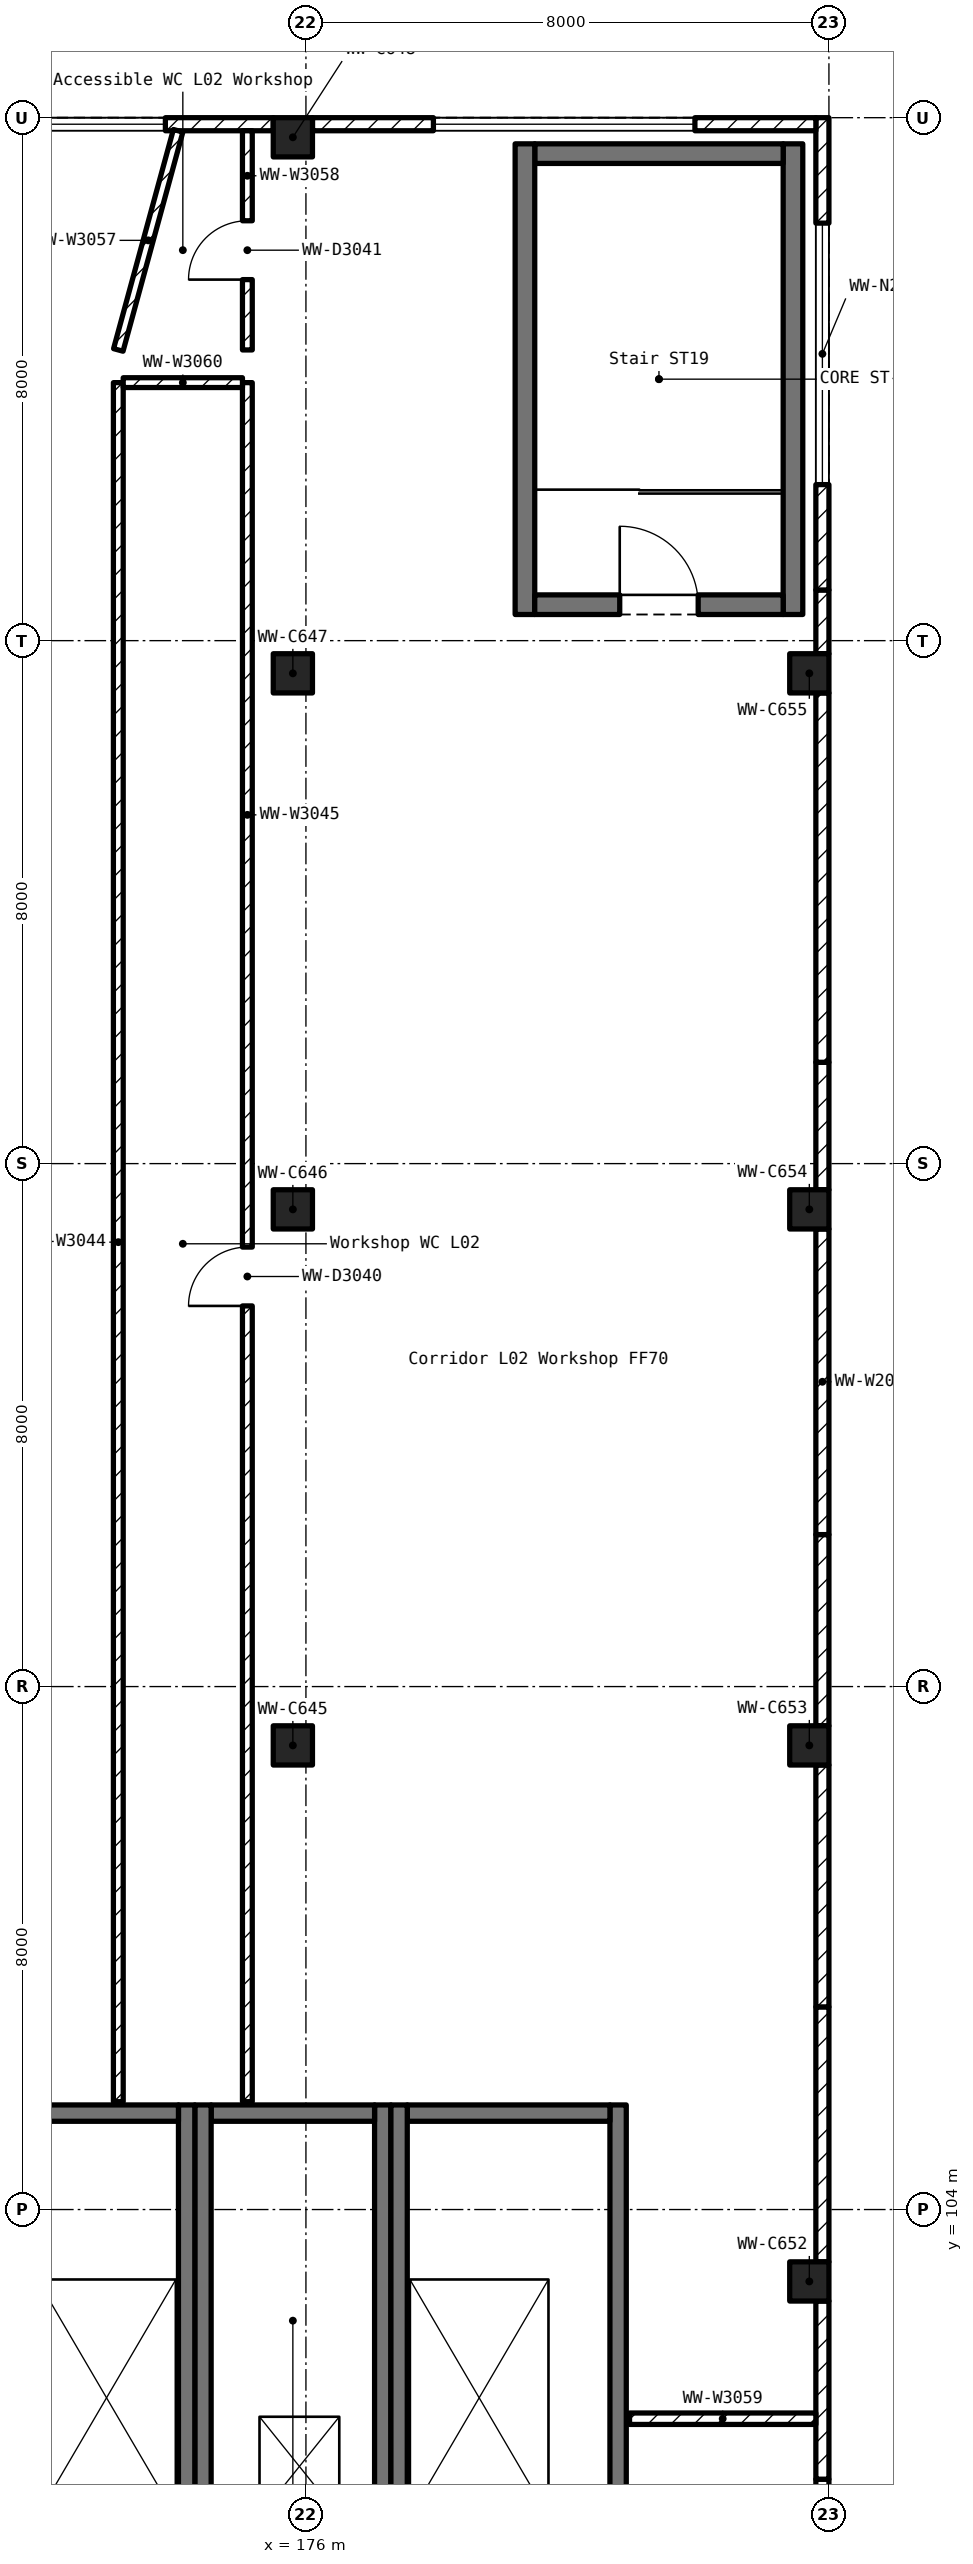
"""IFC4 building model, lengths in metres.
Left out: names, types, materials, properties, quantities, classifications, styles, units other than length and angle.
Written with IfcOpenShell. Run it as: python <this file> out.ifc"""

import sys

from ifc_helpers import new_model, si_unit, direction, frame, frame_2d, origin, origin_2d, place, context, subcontext, project, spatial, rectangle, extrude, element, fill, save


model = new_model("IFC4")
c1 = context("Model", 3, precision=1e-05, world=origin(), true_north=direction((0.0, 1.0)))
c2 = subcontext(c1, "Body", "Model", "MODEL_VIEW")
j1 = project(units=[si_unit("LENGTHUNIT", "METRE"), si_unit("PLANEANGLEUNIT", "RADIAN")], contexts=[c1])
p1 = place(None, origin())
s1 = spatial("IfcSite", under=j1, at=p1, CompositionType="ELEMENT")
p2 = place(p1, origin())
s2 = spatial("IfcBuilding", under=s1, at=p2, CompositionType="ELEMENT")
p3 = place(p2, frame((0.0, 0.0, 11.5)))
s3 = spatial("IfcBuildingStorey", under=s2, at=p3, CompositionType="ELEMENT", Elevation=11.5)
for number, where, z_axis, x_axis in (
    (1, (175.8, 111.1, 0.0), (0.0, 0.0, 1.0), (1.0, 0.0, 0.0)),
    (2, (175.8, 119.3, 0.0), (0.0, 0.0, 1.0), (1.0, 0.0, 0.0)),
    (3, (175.8, 127.5, 0.0), (0.0, 0.0, 1.0), (1.0, 0.0, 0.0)),
    (4, (175.8, 135.7, 0.0), (0.0, 0.0, 1.0), (1.0, 0.0, 0.0)),
    (5, (183.7, 102.9, 0.0), (0.0, 0.0, 1.0), (1.0, 0.0, 0.0)),
    (6, (183.7, 111.1, 0.0), (0.0, 0.0, 1.0), (1.0, 0.0, 0.0)),
    (7, (183.7, 119.3, 0.0), (0.0, 0.0, 1.0), (1.0, 0.0, 0.0)),
    (8, (183.7, 127.5, 0.0), (0.0, 0.0, 1.0), (1.0, 0.0, 0.0)),
):
    element("IfcColumn", number, at=place(p3, frame(where, z_axis=z_axis, x_axis=x_axis)), inside=s3, PredefinedType="COLUMN", context=c2, shape_type="SweptSolid", body=[
        extrude(rectangle(XDim=0.6, YDim=0.6, at=origin_2d()), origin(), (0.0, 0.0, 1.0), 5.5),
    ])
p4 = place(p3, frame((183.9, 95.0, 0.0), z_axis=(0.0, 0.0, 1.0), x_axis=(0.0, 1.0, 0.0)))
e9 = element("IfcWall", 9, at=p4, inside=s3, PredefinedType="SOLIDWALL", context=c2, shape_type="SweptSolid", body=[
    extrude(rectangle(XDim=4.875, YDim=0.2, at=frame_2d((2.438, 0.0))), origin(), (0.0, 0.0, 1.0), 4.55),
])
p5 = place(p3, frame((183.9, 99.875, 0.0), z_axis=(0.0, 0.0, 1.0), x_axis=(0.0, 1.0, 0.0)))
e10 = element("IfcWall", 10, at=p5, inside=s3, PredefinedType="SOLIDWALL", context=c2, shape_type="SweptSolid", body=[
    extrude(rectangle(XDim=2.725, YDim=0.2, at=frame_2d((1.363, 0.0))), origin(), (0.0, 0.0, 1.0), 4.45),
])
p6 = place(p3, frame((183.9, 103.2, 0.0), z_axis=(0.0, 0.0, 1.0), x_axis=(0.0, 1.0, 0.0)))
e11 = element("IfcWall", 11, at=p6, inside=s3, PredefinedType="SOLIDWALL", context=c2, shape_type="SweptSolid", body=[
    extrude(rectangle(XDim=3.9, YDim=0.2, at=frame_2d((1.95, 0.0))), origin(), (0.0, 0.0, 1.0), 4.45),
])
p7 = place(p3, frame((183.9, 107.1, 0.0), z_axis=(0.0, 0.0, 1.0), x_axis=(0.0, 1.0, 0.0)))
e12 = element("IfcWall", 12, at=p7, inside=s3, PredefinedType="SOLIDWALL", context=c2, shape_type="SweptSolid", body=[
    extrude(rectangle(XDim=3.7, YDim=0.2, at=frame_2d((1.85, 0.0))), origin(), (0.0, 0.0, 1.0), 4.45),
])
p8 = place(p3, frame((183.9, 111.4, 0.0), z_axis=(0.0, 0.0, 1.0), x_axis=(0.0, 1.0, 0.0)))
e13 = element("IfcWall", 13, at=p8, inside=s3, PredefinedType="SOLIDWALL", context=c2, shape_type="SweptSolid", body=[
    extrude(rectangle(XDim=2.925, YDim=0.2, at=frame_2d((1.462, 0.0))), origin(), (0.0, 0.0, 1.0), 4.45),
])
p9 = place(p3, frame((183.9, 114.325, 0.0), z_axis=(0.0, 0.0, 1.0), x_axis=(0.0, 1.0, 0.0)))
e14 = element("IfcWall", 14, at=p9, inside=s3, PredefinedType="SOLIDWALL", context=c2, shape_type="SweptSolid", body=[
    extrude(rectangle(XDim=4.675, YDim=0.2, at=frame_2d((2.337, 0.0))), origin(), (0.0, 0.0, 1.0), 4.45),
])
p10 = place(p3, frame((183.9, 119.6, 0.0), z_axis=(0.0, 0.0, 1.0), x_axis=(0.0, 1.0, 0.0)))
e15 = element("IfcWall", 15, at=p10, inside=s3, PredefinedType="SOLIDWALL", context=c2, shape_type="SweptSolid", body=[
    extrude(rectangle(XDim=1.95, YDim=0.2, at=frame_2d((0.975, 0.0))), origin(), (0.0, 0.0, 1.0), 4.45),
])
p11 = place(p3, frame((183.9, 121.55, 0.0), z_axis=(0.0, 0.0, 1.0), x_axis=(0.0, 1.0, 0.0)))
e16 = element("IfcWall", 16, at=p11, inside=s3, PredefinedType="SOLIDWALL", context=c2, shape_type="SweptSolid", body=[
    extrude(rectangle(XDim=5.65, YDim=0.2, at=frame_2d((2.825, 0.0))), origin(), (0.0, 0.0, 1.0), 4.45),
])
p12 = place(p3, frame((183.9, 127.8, 0.0), z_axis=(0.0, 0.0, 1.0), x_axis=(0.0, 1.0, 0.0)))
e17 = element("IfcWall", 17, at=p12, inside=s3, PredefinedType="SOLIDWALL", context=c2, shape_type="SweptSolid", body=[
    extrude(rectangle(XDim=0.975, YDim=0.2, at=frame_2d((0.487, 0.0))), origin(), (0.0, 0.0, 1.0), 4.45),
])
p13 = place(p3, frame((183.9, 128.775, 0.0), z_axis=(0.0, 0.0, 1.0), x_axis=(0.0, 1.0, 0.0)))
e18 = element("IfcWall", 18, at=p13, inside=s3, PredefinedType="SOLIDWALL", context=c2, shape_type="SweptSolid", body=[
    extrude(rectangle(XDim=7.225, YDim=0.2, at=frame_2d((3.613, 0.0))), origin(), (0.0, 0.0, 1.0), 4.45),
])
p14 = place(p13, frame((1.612, 0.0, 1.0)))
e19 = element("IfcOpeningElement", 19, at=p14, cuts=e18, PredefinedType="OPENING", context=c2, shape_type="SweptSolid", body=[
    extrude(rectangle(XDim=4.0, YDim=1.8, at=frame_2d((2.0, 0.9))), frame((0.0, 0.112, 0.0), z_axis=(0.0, -1.0, 0.0), x_axis=(1.0, 0.0, 0.0)), (0.0, 0.0, 1.0), 0.224),
])
p15 = place(p3, frame((183.8, 135.9, 0.0), z_axis=(0.0, 0.0, 1.0), x_axis=(-1.0, 0.0, 0.0)))
e20 = element("IfcWall", 20, at=p15, inside=s3, PredefinedType="SOLIDWALL", context=c2, shape_type="SweptSolid", body=[
    extrude(rectangle(XDim=7.7, YDim=0.2, at=frame_2d((3.85, 0.0))), origin(), (0.0, 0.0, 1.0), 4.45),
])
p16 = place(p15, frame((1.85, 0.0, 1.0)))
e21 = element("IfcOpeningElement", 21, at=p16, cuts=e20, PredefinedType="OPENING", context=c2, shape_type="SweptSolid", body=[
    extrude(rectangle(XDim=4.0, YDim=1.8, at=frame_2d((2.0, 0.9))), frame((0.0, 0.112, 0.0), z_axis=(0.0, -1.0, 0.0), x_axis=(1.0, 0.0, 0.0)), (0.0, 0.0, 1.0), 0.224),
])
p17 = place(p3, frame((175.5, 135.9, 0.0), z_axis=(0.0, 0.0, 1.0), x_axis=(-1.0, 0.0, 0.0)))
e22 = element("IfcWall", 22, at=p17, inside=s3, PredefinedType="SOLIDWALL", context=c2, shape_type="SweptSolid", body=[
    extrude(rectangle(XDim=7.3, YDim=0.2, at=frame_2d((3.65, 0.0))), origin(), (0.0, 0.0, 1.0), 4.45),
])
p18 = place(p17, frame((1.65, 0.0, 1.0)))
e23 = element("IfcOpeningElement", 23, at=p18, cuts=e22, PredefinedType="OPENING", context=c2, shape_type="SweptSolid", body=[
    extrude(rectangle(XDim=4.0, YDim=1.8, at=frame_2d((2.0, 0.9))), frame((0.0, 0.112, 0.0), z_axis=(0.0, -1.0, 0.0), x_axis=(1.0, 0.0, 0.0)), (0.0, 0.0, 1.0), 0.224),
])
p19 = place(p3, frame((183.45, 128.4, 0.0), z_axis=(0.0, 0.0, 1.0), x_axis=(0.0, 1.0, 0.0)))
e24 = element("IfcWall", 24, at=p19, inside=s3, PredefinedType="SOLIDWALL", context=c2, shape_type="SweptSolid", body=[
    extrude(rectangle(XDim=7.2, YDim=0.3, at=frame_2d((3.6, 0.0))), origin(), (0.0, 0.0, 1.0), 5.25),
])
p20 = place(p3, frame((183.3, 135.45, 0.0), z_axis=(0.0, 0.0, 1.0), x_axis=(-1.0, 0.0, 0.0)))
e25 = element("IfcWall", 25, at=p20, inside=s3, PredefinedType="SOLIDWALL", context=c2, shape_type="SweptSolid", body=[
    extrude(rectangle(XDim=3.8, YDim=0.3, at=frame_2d((1.9, 0.0))), origin(), (0.0, 0.0, 1.0), 5.25),
])
p21 = place(p3, frame((179.35, 135.6, 0.0), z_axis=(0.0, 0.0, 1.0), x_axis=(0.0, -1.0, 0.0)))
e26 = element("IfcWall", 26, at=p21, inside=s3, PredefinedType="SOLIDWALL", context=c2, shape_type="SweptSolid", body=[
    extrude(rectangle(XDim=7.2, YDim=0.3, at=frame_2d((3.6, 0.0))), origin(), (0.0, 0.0, 1.0), 5.25),
])
p22 = place(p3, frame((179.5, 128.55, 0.0), z_axis=(0.0, 0.0, 1.0), x_axis=(1.0, 0.0, 0.0)))
e27 = element("IfcWall", 27, at=p22, inside=s3, PredefinedType="SOLIDWALL", context=c2, shape_type="SweptSolid", body=[
    extrude(rectangle(XDim=3.8, YDim=0.3, at=frame_2d((1.9, 0.0))), origin(), (0.0, 0.0, 1.0), 5.25),
])
p23 = place(p22, frame((1.3, 0.0, 0.0)))
e28 = element("IfcOpeningElement", 28, at=p23, cuts=e27, PredefinedType="OPENING", context=c2, shape_type="SweptSolid", body=[
    extrude(rectangle(XDim=1.2, YDim=2.1, at=frame_2d((0.6, 1.05))), frame((0.0, 0.162, 0.0), z_axis=(0.0, -1.0, 0.0), x_axis=(1.0, 0.0, 0.0)), (0.0, 0.0, 1.0), 0.324),
])
p24 = place(p3, frame((177.175, 99.0, 0.0), z_axis=(0.0, 0.0, 1.0), x_axis=(0.0, 1.0, 0.0)))
e29 = element("IfcWall", 29, at=p24, inside=s3, PredefinedType="SOLIDWALL", context=c2, shape_type="SweptSolid", body=[
    extrude(rectangle(XDim=6.6, YDim=0.25, at=frame_2d((3.3, 0.0))), origin(), (0.0, 0.0, 1.0), 5.5),
])
p25 = place(p3, frame((177.05, 105.475, 0.0), z_axis=(0.0, 0.0, 1.0), x_axis=(-1.0, 0.0, 0.0)))
e30 = element("IfcWall", 30, at=p25, inside=s3, PredefinedType="SOLIDWALL", context=c2, shape_type="SweptSolid", body=[
    extrude(rectangle(XDim=2.5, YDim=0.25, at=frame_2d((1.25, 0.0))), origin(), (0.0, 0.0, 1.0), 5.5),
])
for number, where, z_axis, x_axis in (
    (31, (174.425, 105.6, 0.0), (0.0, 0.0, 1.0), (0.0, -1.0, 0.0)),
    (32, (174.175, 99.0, 0.0), (0.0, 0.0, 1.0), (0.0, 1.0, 0.0)),
):
    element("IfcWall", number, at=place(p3, frame(where, z_axis=z_axis, x_axis=x_axis)), inside=s3, PredefinedType="SOLIDWALL", context=c2, shape_type="SweptSolid", body=[
        extrude(rectangle(XDim=6.6, YDim=0.25, at=frame_2d((3.3, 0.0))), origin(), (0.0, 0.0, 1.0), 5.5),
    ])
p26 = place(p3, frame((174.05, 105.475, 0.0), z_axis=(0.0, 0.0, 1.0), x_axis=(-1.0, 0.0, 0.0)))
e33 = element("IfcWall", 33, at=p26, inside=s3, PredefinedType="SOLIDWALL", context=c2, shape_type="SweptSolid", body=[
    extrude(rectangle(XDim=3.1, YDim=0.25, at=frame_2d((1.55, 0.0))), origin(), (0.0, 0.0, 1.0), 5.5),
])
p27 = place(p3, frame((180.775, 99.0, 0.0), z_axis=(0.0, 0.0, 1.0), x_axis=(0.0, 1.0, 0.0)))
e34 = element("IfcWall", 34, at=p27, inside=s3, PredefinedType="SOLIDWALL", context=c2, shape_type="SweptSolid", body=[
    extrude(rectangle(XDim=6.6, YDim=0.25, at=frame_2d((3.3, 0.0))), origin(), (0.0, 0.0, 1.0), 5.5),
])
p28 = place(p3, frame((180.65, 105.475, 0.0), z_axis=(0.0, 0.0, 1.0), x_axis=(-1.0, 0.0, 0.0)))
e35 = element("IfcWall", 35, at=p28, inside=s3, PredefinedType="SOLIDWALL", context=c2, shape_type="SweptSolid", body=[
    extrude(rectangle(XDim=3.1, YDim=0.25, at=frame_2d((1.55, 0.0))), origin(), (0.0, 0.0, 1.0), 5.5),
])
p29 = place(p3, frame((177.425, 105.6, 0.0), z_axis=(0.0, 0.0, 1.0), x_axis=(0.0, -1.0, 0.0)))
e36 = element("IfcWall", 36, at=p29, inside=s3, PredefinedType="SOLIDWALL", context=c2, shape_type="SweptSolid", body=[
    extrude(rectangle(XDim=6.6, YDim=0.25, at=frame_2d((3.3, 0.0))), origin(), (0.0, 0.0, 1.0), 5.5),
])
p30 = place(p3, frame((173.13, 131.947, 0.0), z_axis=(0.0, 0.0, 1.0), x_axis=(0.0, -1.0, 0.0)))
e37 = element("IfcWall", 37, at=p30, inside=s3, PredefinedType="PARTITIONING", context=c2, shape_type="SweptSolid", body=[
    extrude(rectangle(XDim=26.297, YDim=0.15, at=frame_2d((13.148, 0.0))), origin(), (0.0, 0.0, 1.0), 4.35),
])
p31 = place(p3, frame((175.104, 105.65, 0.0), z_axis=(0.0, 0.0, 1.0), x_axis=(0.0, 1.0, 0.0)))
e38 = element("IfcWall", 38, at=p31, inside=s3, PredefinedType="PARTITIONING", context=c2, shape_type="SweptSolid", body=[
    extrude(rectangle(XDim=26.297, YDim=0.15, at=frame_2d((13.148, 0.0))), origin(), (0.0, 0.0, 1.0), 4.35),
])
p32 = place(p31, frame((12.173, 0.0, 0.0)))
e39 = element("IfcOpeningElement", 39, at=p32, cuts=e38, PredefinedType="OPENING", context=c2, shape_type="SweptSolid", body=[
    extrude(rectangle(XDim=0.9, YDim=2.1, at=frame_2d((0.45, 1.05))), frame((0.0, 0.087, 0.0), z_axis=(0.0, -1.0, 0.0), x_axis=(1.0, 0.0, 0.0)), (0.0, 0.0, 1.0), 0.174),
])
p33 = place(p3, frame((174.045, 135.8, 0.0), z_axis=(0.0, 0.0, 1.0), x_axis=(-0.263271937706, -0.964721662873, 0.0)))
e40 = element("IfcWall", 40, at=p33, inside=s3, PredefinedType="PARTITIONING", context=c2, shape_type="SweptSolid", body=[
    extrude(rectangle(XDim=3.476, YDim=0.15, at=frame_2d((1.738, 0.0))), origin(), (0.0, 0.0, 1.0), 4.35),
])
p34 = place(p3, frame((175.104, 132.447, 0.0), z_axis=(0.0, 0.0, 1.0), x_axis=(0.0, 1.0, 0.0)))
e41 = element("IfcWall", 41, at=p34, inside=s3, PredefinedType="PARTITIONING", context=c2, shape_type="SweptSolid", body=[
    extrude(rectangle(XDim=3.353, YDim=0.15, at=frame_2d((1.677, 0.0))), origin(), (0.0, 0.0, 1.0), 4.35),
])
p35 = place(p34, frame((1.076, 0.0, 0.0)))
e42 = element("IfcOpeningElement", 42, at=p35, cuts=e41, PredefinedType="OPENING", context=c2, shape_type="SweptSolid", body=[
    extrude(rectangle(XDim=0.9, YDim=2.1, at=frame_2d((0.45, 1.05))), frame((0.0, 0.087, 0.0), z_axis=(0.0, -1.0, 0.0), x_axis=(1.0, 0.0, 0.0)), (0.0, 0.0, 1.0), 0.174),
])
p36 = place(p3, frame((183.8, 100.8, 0.0), z_axis=(0.0, 0.0, 1.0), x_axis=(-1.0, 0.0, 0.0)))
e43 = element("IfcWall", 43, at=p36, inside=s3, PredefinedType="PARTITIONING", context=c2, shape_type="SweptSolid", body=[
    extrude(rectangle(XDim=2.85, YDim=0.175, at=frame_2d((1.425, 0.0))), origin(), (0.0, 0.0, 1.0), 4.35),
])
p37 = place(p3, frame((175.029, 131.947, 0.0), z_axis=(0.0, 0.0, 1.0), x_axis=(-1.0, 0.0, 0.0)))
e44 = element("IfcWall", 44, at=p37, inside=s3, PredefinedType="PARTITIONING", context=c2, shape_type="SweptSolid", body=[
    extrude(rectangle(XDim=1.824, YDim=0.15, at=frame_2d((0.912, 0.0))), origin(), (0.0, 0.0, 1.0), 4.35),
])
p38 = place(p14, origin())
e45 = element("IfcWindow", 45, at=p38, inside=s3, PartitioningType="DOUBLE_PANEL_VERTICAL", PredefinedType="WINDOW", context=c2, shape_type="SweptSolid", body=[
    extrude(rectangle(XDim=4.0, YDim=1.8, at=frame_2d((2.0, 0.9))), frame((0.0, 0.03, 0.0), z_axis=(0.0, -1.0, 0.0), x_axis=(1.0, 0.0, 0.0)), (0.0, 0.0, 1.0), 0.06),
])
fill(e19, e45)
p39 = place(p16, origin())
e46 = element("IfcWindow", 46, at=p39, inside=s3, PartitioningType="DOUBLE_PANEL_VERTICAL", PredefinedType="WINDOW", context=c2, shape_type="SweptSolid", body=[
    extrude(rectangle(XDim=4.0, YDim=1.8, at=frame_2d((2.0, 0.9))), frame((0.0, 0.03, 0.0), z_axis=(0.0, -1.0, 0.0), x_axis=(1.0, 0.0, 0.0)), (0.0, 0.0, 1.0), 0.06),
])
fill(e21, e46)
p40 = place(p18, origin())
e47 = element("IfcWindow", 47, at=p40, inside=s3, PartitioningType="DOUBLE_PANEL_VERTICAL", PredefinedType="WINDOW", context=c2, shape_type="SweptSolid", body=[
    extrude(rectangle(XDim=4.0, YDim=1.8, at=frame_2d((2.0, 0.9))), frame((0.0, 0.03, 0.0), z_axis=(0.0, -1.0, 0.0), x_axis=(1.0, 0.0, 0.0)), (0.0, 0.0, 1.0), 0.06),
])
fill(e23, e47)
p41 = place(p23, origin())
e48 = element("IfcDoor", 48, at=p41, inside=s3, OperationType="SINGLE_SWING_LEFT", PredefinedType="DOOR", context=c2, shape_type="SweptSolid", body=[
    extrude(rectangle(XDim=1.2, YDim=2.1, at=frame_2d((0.6, 1.05))), frame((0.0, 0.025, 0.0), z_axis=(0.0, -1.0, 0.0), x_axis=(1.0, 0.0, 0.0)), (0.0, 0.0, 1.0), 0.05),
])
fill(e28, e48)
p42 = place(p32, origin())
e49 = element("IfcDoor", 49, at=p42, inside=s3, OperationType="SINGLE_SWING_LEFT", PredefinedType="DOOR", context=c2, shape_type="SweptSolid", body=[
    extrude(rectangle(XDim=0.9, YDim=2.1, at=frame_2d((0.45, 1.05))), frame((0.0, 0.025, 0.0), z_axis=(0.0, -1.0, 0.0), x_axis=(1.0, 0.0, 0.0)), (0.0, 0.0, 1.0), 0.05),
])
fill(e39, e49)
p43 = place(p35, origin())
e50 = element("IfcDoor", 50, at=p43, inside=s3, OperationType="SINGLE_SWING_LEFT", PredefinedType="DOOR", context=c2, shape_type="SweptSolid", body=[
    extrude(rectangle(XDim=0.9, YDim=2.1, at=frame_2d((0.45, 1.05))), frame((0.0, 0.025, 0.0), z_axis=(0.0, -1.0, 0.0), x_axis=(1.0, 0.0, 0.0)), (0.0, 0.0, 1.0), 0.05),
])
fill(e42, e50)
save(model, sys.argv[1])
